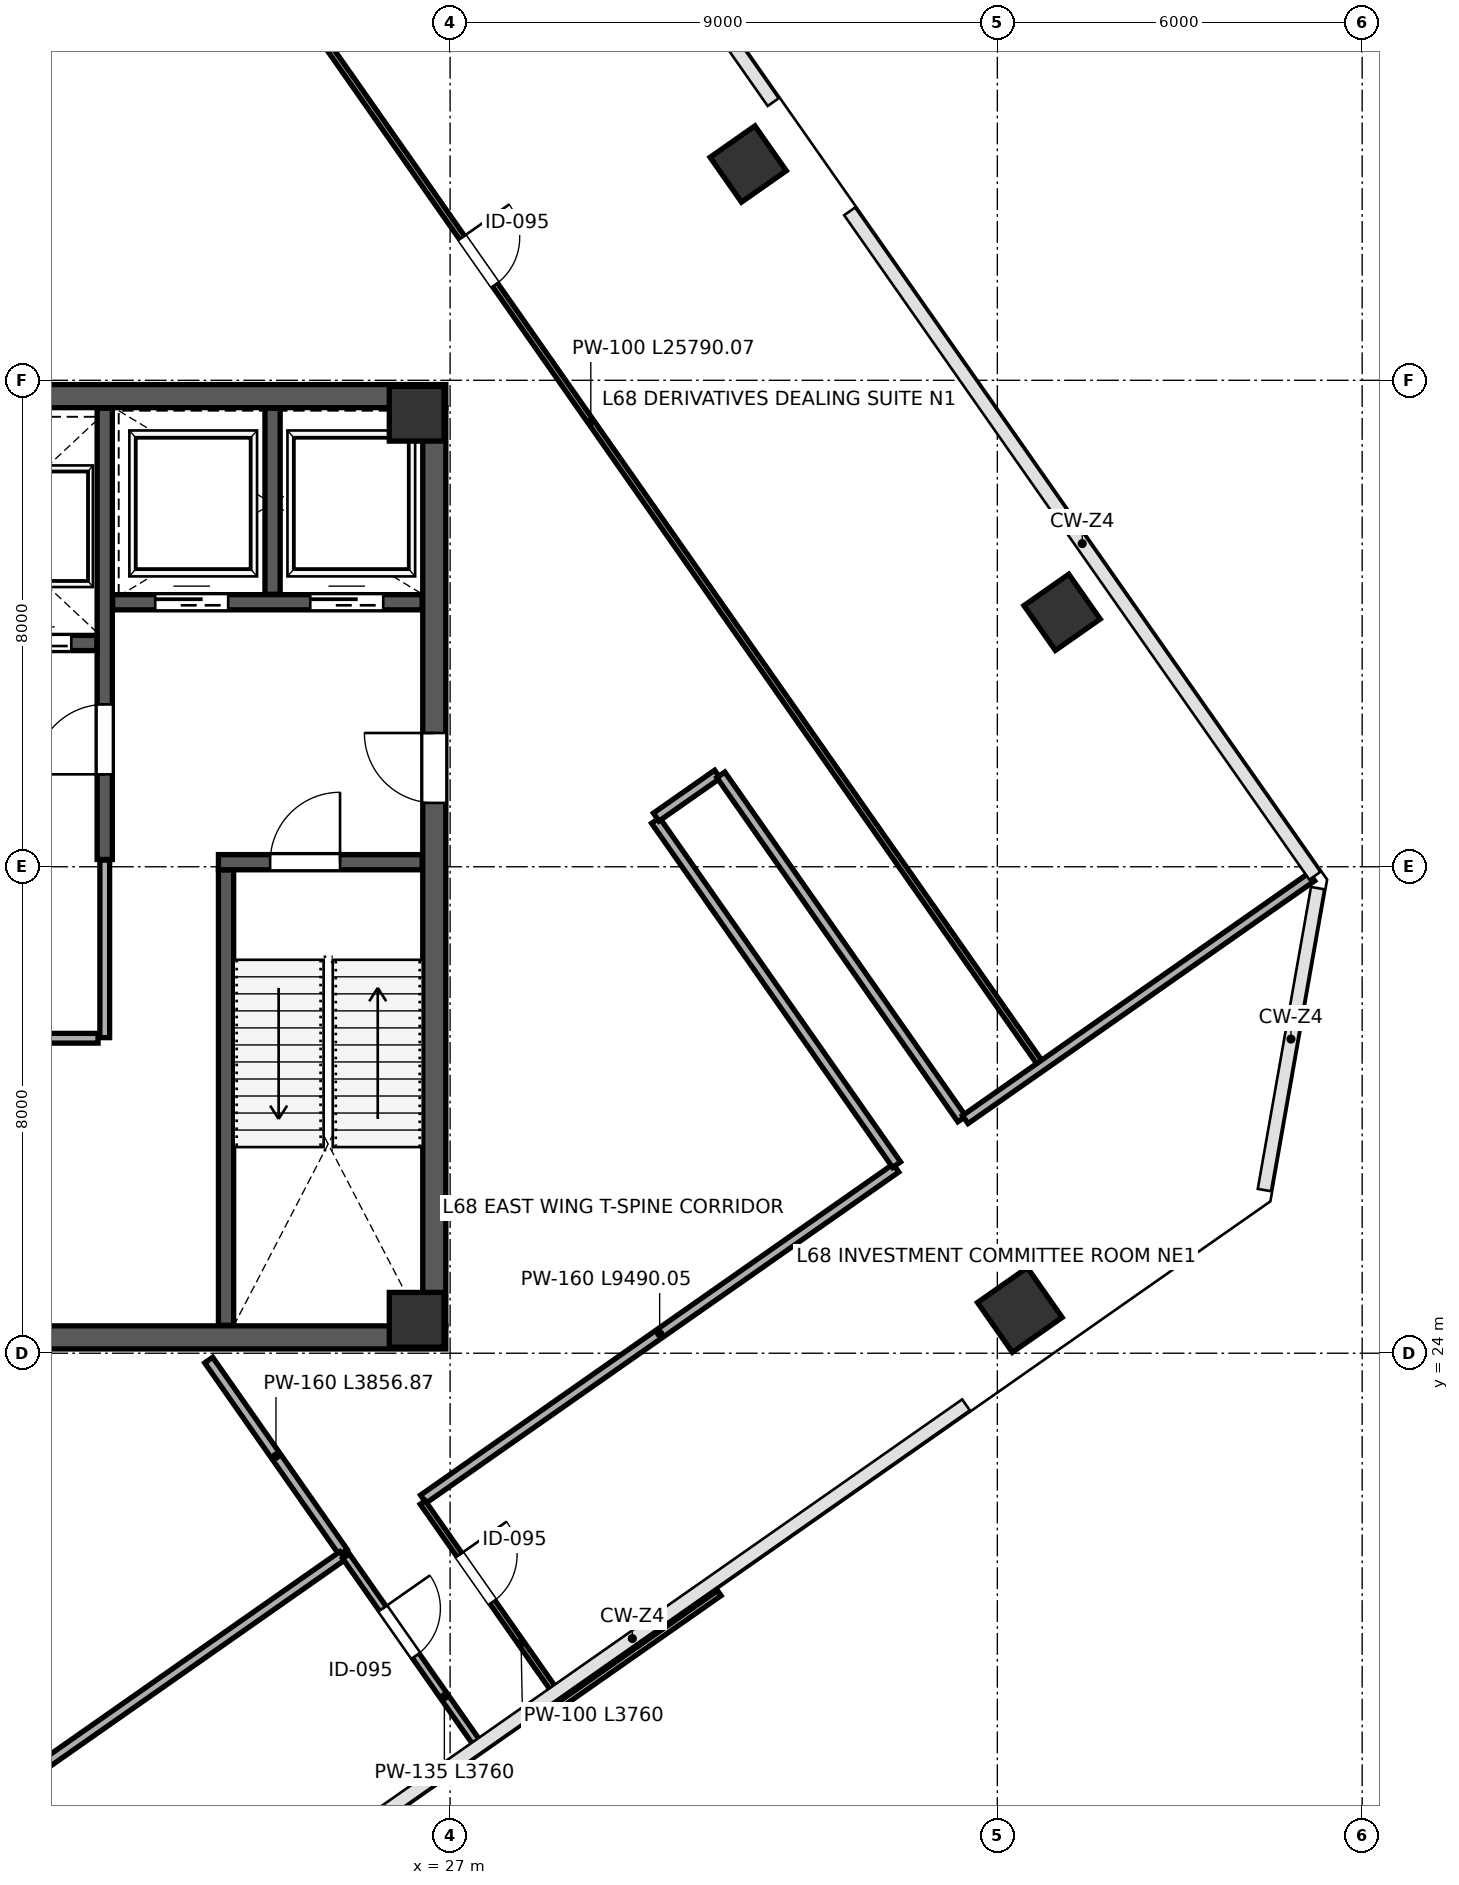
"""IFC4 building model, lengths in metres.
Left out: names, types, materials, properties, quantities, classifications, styles, units other than length and angle.
Written with IfcOpenShell. Run it as: python <this file> out.ifc"""

import sys

from ifc_helpers import new_model, si_unit, direction, frame, frame_2d, origin, origin_2d, place, context, subcontext, project, spatial, rectangle, extrude, clip, halfspace, source, transform, mapped, element, fill, save


model = new_model("IFC4")
c1 = context("Model", 3, precision=1e-05, world=origin(), true_north=direction((0.0, 1.0)))
c2 = subcontext(c1, "Body", "Model", "MODEL_VIEW")
j1 = project(units=[si_unit("LENGTHUNIT", "METRE"), si_unit("PLANEANGLEUNIT", "RADIAN")], contexts=[c1])
p1 = place(None, origin())
s1 = spatial("IfcSite", under=j1, at=p1, CompositionType="ELEMENT")
p2 = place(p1, origin())
s2 = spatial("IfcBuilding", under=s1, at=p2, CompositionType="ELEMENT")
p3 = place(p2, frame((0.0, 0.0, 303.0)))
s3 = spatial("IfcBuildingStorey", under=s2, at=p3, CompositionType="ELEMENT", Elevation=303.0)
m1 = source(origin(), c2, "Body", "SweptSolid", [
    extrude(rectangle(XDim=0.9, YDim=0.9, at=origin_2d()), origin(), (0.0, 0.0, 1.0), 4.198),
])
for number, where, z_axis, x_axis in (
    (1, (26.45, 24.55, 0.001), (0.0, 0.0, 1.0), (1.0, 0.0, 0.0)),
    (2, (26.45, 39.45, 0.001), (0.0, 0.0, 1.0), (1.0, 0.0, 0.0)),
):
    element("IfcColumn", number, at=place(p3, frame(where, z_axis=z_axis, x_axis=x_axis)), inside=s3, PredefinedType="COLUMN", context=c2, shape_type="MappedRepresentation", body=[
        mapped(m1, transform((0.0, 0.0, 0.0), scale=1.0)),
    ])
p4 = place(p3, frame((31.903, 43.557, 0.0), z_axis=(0.116149103088, -0.109205406707, 0.987209990325), x_axis=(-0.982055587014, 0.136059325821, 0.130593582814)))
e3 = element("IfcColumn", 3, at=p4, inside=s3, PredefinedType="COLUMN", context=c2, shape_type="Clipping", body=[
    clip(clip(extrude(rectangle(XDim=0.9, YDim=0.9, at=origin_2d()), origin(), (0.0, 0.0, 1.0), 4.254), halfspace(frame((0.0, 0.0, 0.102), z_axis=(0.0, 0.0, -1.0), x_axis=(1.0, 0.0, 0.0)), False)), halfspace(frame((0.0, 0.0, 4.152), z_axis=(0.0, 0.0, 1.0), x_axis=(1.0, 0.0, 0.0)), False)),
])
p5 = place(p3, frame((37.065, 36.184, 0.0), z_axis=(0.039386712423, -0.160356091191, 0.986273091442), x_axis=(-0.749730751195, 0.647771912034, 0.135260307157)))
e4 = element("IfcColumn", 4, at=p5, inside=s3, PredefinedType="COLUMN", context=c2, shape_type="Clipping", body=[
    clip(clip(extrude(rectangle(XDim=0.9, YDim=0.9, at=origin_2d()), origin(), (0.0, 0.0, 1.0), 4.258), halfspace(frame((0.0, 0.0, 0.106), z_axis=(0.0, 0.0, -1.0), x_axis=(1.0, 0.0, 0.0)), False)), halfspace(frame((0.0, 0.0, 4.153), z_axis=(0.0, 0.0, 1.0), x_axis=(1.0, 0.0, 0.0)), False)),
])
p6 = place(p3, frame((36.37, 24.711, 0.0), z_axis=(-0.077911131198, -0.150609091116, 0.985518522053), x_axis=(-0.138522674046, 0.980570116481, 0.138901819423)))
e5 = element("IfcColumn", 5, at=p6, inside=s3, PredefinedType="COLUMN", context=c2, shape_type="Clipping", body=[
    clip(clip(extrude(rectangle(XDim=1.0, YDim=1.0, at=origin_2d()), origin(), (0.0, 0.0, 1.0), 4.262), halfspace(frame((0.0, 0.0, 0.121), z_axis=(0.0, 0.0, -1.0), x_axis=(1.0, 0.0, 0.0)), False)), halfspace(frame((0.0, 0.0, 4.141), z_axis=(0.0, 0.0, 1.0), x_axis=(1.0, 0.0, 0.0)), False)),
])
p7 = place(p3, frame((26.74, 24.45, 0.0), z_axis=(0.0, 0.0, 1.0), x_axis=(0.0, 1.0, 0.0)))
e6 = element("IfcWall", 6, at=p7, inside=s3, PredefinedType="SHEAR", context=c2, shape_type="SweptSolid", body=[
    extrude(rectangle(XDim=15.1, YDim=0.38, at=frame_2d((7.55, 0.0))), origin(), (0.0, 0.0, 1.0), 3.96),
])
p8 = place(p7, frame((8.6, 0.0, 0.0)))
e7 = element("IfcOpeningElement", 7, at=p8, cuts=e6, PredefinedType="OPENING", context=c2, shape_type="SweptSolid", body=[
    extrude(rectangle(XDim=1.15, YDim=2.2, at=frame_2d((0.575, 1.1))), frame((0.0, 0.2, 0.0), z_axis=(0.0, -1.0, 0.0), x_axis=(1.0, 0.0, 0.0)), (0.0, 0.0, 1.0), 0.4),
])
for number, where, z_axis, x_axis in (
    (8, (9.07, 24.26, 0.0), (0.0, 0.0, 1.0), (1.0, 0.0, 0.0)),
    (9, (9.07, 39.74, 0.0), (0.0, 0.0, 1.0), (1.0, 0.0, 0.0)),
):
    element("IfcWall", number, at=place(p3, frame(where, z_axis=z_axis, x_axis=x_axis)), inside=s3, PredefinedType="SHEAR", context=c2, shape_type="SweptSolid", body=[
        extrude(rectangle(XDim=17.86, YDim=0.38, at=frame_2d((8.93, 0.0))), origin(), (0.0, 0.0, 1.0), 3.96),
    ])
p9 = place(p3, frame((23.315, 24.46, 0.0), z_axis=(0.0, 0.0, 1.0), x_axis=(0.0, 1.0, 0.0)))
e10 = element("IfcWall", 10, at=p9, inside=s3, PredefinedType="SHEAR", context=c2, shape_type="SweptSolid", body=[
    extrude(rectangle(XDim=7.49, YDim=0.25, at=frame_2d((3.745, 0.0))), origin(), (0.0, 0.0, 1.0), 3.96),
])
p10 = place(p3, frame((23.19, 32.075, 0.0), z_axis=(0.0, 0.0, 1.0), x_axis=(1.0, 0.0, 0.0)))
e11 = element("IfcWall", 11, at=p10, inside=s3, PredefinedType="SHEAR", context=c2, shape_type="SweptSolid", body=[
    extrude(rectangle(XDim=3.35, YDim=0.25, at=frame_2d((1.675, 0.0))), origin(), (0.0, 0.0, 1.0), 3.96),
])
p11 = place(p10, frame((0.85, 0.0, 0.0)))
e12 = element("IfcOpeningElement", 12, at=p11, cuts=e11, PredefinedType="OPENING", context=c2, shape_type="SweptSolid", body=[
    extrude(rectangle(XDim=1.15, YDim=2.2, at=frame_2d((0.575, 1.1))), frame((0.0, 0.135, 0.0), z_axis=(0.0, -1.0, 0.0), x_axis=(1.0, 0.0, 0.0)), (0.0, 0.0, 1.0), 0.27),
])
p12 = place(p3, frame((21.32, 32.12, 0.0), z_axis=(0.0, 0.0, 1.0), x_axis=(0.0, 1.0, 0.0)))
e13 = element("IfcWall", 13, at=p12, inside=s3, PredefinedType="SHEAR", context=c2, shape_type="SweptSolid", body=[
    extrude(rectangle(XDim=7.42, YDim=0.25, at=frame_2d((3.71, 0.0))), origin(), (0.0, 0.0, 1.0), 3.96),
])
p13 = place(p12, frame((1.4, 0.0, 0.0)))
e14 = element("IfcOpeningElement", 14, at=p13, cuts=e13, PredefinedType="OPENING", context=c2, shape_type="SweptSolid", body=[
    extrude(rectangle(XDim=1.15, YDim=2.2, at=frame_2d((0.575, 1.1))), frame((0.0, 0.135, 0.0), z_axis=(0.0, -1.0, 0.0), x_axis=(1.0, 0.0, 0.0)), (0.0, 0.0, 1.0), 0.27),
])
p14 = place(p3, frame((21.45, 36.35, 0.0), z_axis=(0.0, 0.0, 1.0), x_axis=(1.0, 0.0, 0.0)))
e15 = element("IfcWall", 15, at=p14, inside=s3, PredefinedType="SHEAR", context=c2, shape_type="SweptSolid", body=[
    extrude(rectangle(XDim=5.09, YDim=0.25, at=frame_2d((2.545, 0.0))), origin(), (0.0, 0.0, 1.0), 3.96),
])
p15 = place(p14, frame((0.7, 0.0, 0.0)))
e16 = element("IfcOpeningElement", 16, at=p15, cuts=e15, PredefinedType="OPENING", context=c2, shape_type="SweptSolid", body=[
    extrude(rectangle(XDim=1.2, YDim=2.2, at=frame_2d((0.6, 1.1))), frame((0.0, 0.135, 0.0), z_axis=(0.0, -1.0, 0.0), x_axis=(1.0, 0.0, 0.0)), (0.0, 0.0, 1.0), 0.27),
])
p16 = place(p14, frame((3.25, 0.0, 0.0)))
e17 = element("IfcOpeningElement", 17, at=p16, cuts=e15, PredefinedType="OPENING", context=c2, shape_type="SweptSolid", body=[
    extrude(rectangle(XDim=1.2, YDim=2.2, at=frame_2d((0.6, 1.1))), frame((0.0, 0.135, 0.0), z_axis=(0.0, -1.0, 0.0), x_axis=(1.0, 0.0, 0.0)), (0.0, 0.0, 1.0), 0.27),
])
p17 = place(p3, frame((24.08, 36.48, 0.0), z_axis=(0.0, 0.0, 1.0), x_axis=(0.0, 1.0, 0.0)))
e18 = element("IfcWall", 18, at=p17, inside=s3, PredefinedType="SHEAR", context=c2, shape_type="SweptSolid", body=[
    extrude(rectangle(XDim=3.06, YDim=0.25, at=frame_2d((1.53, 0.0))), origin(), (0.0, 0.0, 1.0), 3.96),
])
p18 = place(p3, frame((17.32, 35.68, 0.0), z_axis=(0.0, 0.0, 1.0), x_axis=(1.0, 0.0, 0.0)))
e19 = element("IfcWall", 19, at=p18, inside=s3, PredefinedType="SHEAR", context=c2, shape_type="SweptSolid", body=[
    extrude(rectangle(XDim=3.87, YDim=0.25, at=frame_2d((1.935, 0.0))), origin(), (0.0, 0.0, 1.0), 3.96),
])
p19 = place(p18, frame((0.45, 0.0, 0.0)))
e20 = element("IfcOpeningElement", 20, at=p19, cuts=e19, PredefinedType="OPENING", context=c2, shape_type="SweptSolid", body=[
    extrude(rectangle(XDim=1.1, YDim=2.2, at=frame_2d((0.55, 1.1))), frame((0.0, 0.135, 0.0), z_axis=(0.0, -1.0, 0.0), x_axis=(1.0, 0.0, 0.0)), (0.0, 0.0, 1.0), 0.27),
])
p20 = place(p18, frame((2.35, 0.0, 0.0)))
e21 = element("IfcOpeningElement", 21, at=p20, cuts=e19, PredefinedType="OPENING", context=c2, shape_type="SweptSolid", body=[
    extrude(rectangle(XDim=1.1, YDim=2.2, at=frame_2d((0.55, 1.1))), frame((0.0, 0.135, 0.0), z_axis=(0.0, -1.0, 0.0), x_axis=(1.0, 0.0, 0.0)), (0.0, 0.0, 1.0), 0.27),
])
p21 = place(p3, frame((12.84, 29.18, 0.0), z_axis=(0.0, 0.0, 1.0), x_axis=(1.0, 0.0, 0.0)))
e22 = element("IfcWall", 22, at=p21, inside=s3, PredefinedType="PARTITIONING", context=c2, shape_type="SweptSolid", body=[
    extrude(rectangle(XDim=8.37, YDim=0.16, at=frame_2d((4.185, 0.0))), origin(), (0.0, 0.0, 1.0), 3.96),
])
p22 = place(p21, frame((0.95, 0.0, 0.0)))
e23 = element("IfcOpeningElement", 23, at=p22, cuts=e22, PredefinedType="OPENING", context=c2, shape_type="SweptSolid", body=[
    extrude(rectangle(XDim=0.85, YDim=2.1, at=frame_2d((0.425, 1.05))), frame((0.0, 0.09, 0.0), z_axis=(0.0, -1.0, 0.0), x_axis=(1.0, 0.0, 0.0)), (0.0, 0.0, 1.0), 0.18),
])
p23 = place(p21, frame((4.2, 0.0, 0.0)))
e24 = element("IfcOpeningElement", 24, at=p23, cuts=e22, PredefinedType="OPENING", context=c2, shape_type="SweptSolid", body=[
    extrude(rectangle(XDim=0.85, YDim=2.1, at=frame_2d((0.425, 1.05))), frame((0.0, 0.09, 0.0), z_axis=(0.0, -1.0, 0.0), x_axis=(1.0, 0.0, 0.0)), (0.0, 0.0, 1.0), 0.18),
])
p24 = place(p3, frame((21.32, 29.19, 0.0), z_axis=(0.0, 0.0, 1.0), x_axis=(0.0, 1.0, 0.0)))
e25 = element("IfcWall", 25, at=p24, inside=s3, PredefinedType="PARTITIONING", context=c2, shape_type="SweptSolid", body=[
    extrude(rectangle(XDim=2.92, YDim=0.16, at=frame_2d((1.46, 0.0))), origin(), (0.0, 0.0, 1.0), 3.96),
])
p25 = place(p3, frame((23.03, 23.887, 0.0), z_axis=(0.0, 0.0, 1.0), x_axis=(0.573602525203, -0.819133776059, 0.0)))
e26 = element("IfcWall", 26, at=p25, inside=s3, PredefinedType="PARTITIONING", context=c2, shape_type="SweptSolid", body=[
    extrude(rectangle(XDim=3.857, YDim=0.16, at=frame_2d((1.928, 0.0))), origin(), (0.0, 0.0, 1.0), 3.96),
])
p26 = place(p3, frame((21.918, 49.884, 0.0), z_axis=(0.0, 0.0, 1.0), x_axis=(0.57358495776, -0.819146077468, 0.0)))
e27 = element("IfcWall", 27, at=p26, inside=s3, PredefinedType="PARTITIONING", context=c2, shape_type="SweptSolid", body=[
    extrude(rectangle(XDim=25.79, YDim=0.1, at=frame_2d((12.895, 0.0))), origin(), (0.0, 0.0, 1.0), 3.96),
])
p27 = place(p26, frame((9.2, 0.0, 0.0)))
e28 = element("IfcOpeningElement", 28, at=p27, cuts=e27, PredefinedType="OPENING", context=c2, shape_type="SweptSolid", body=[
    extrude(rectangle(XDim=0.95, YDim=2.15, at=frame_2d((0.475, 1.075))), frame((0.0, 0.06, 0.0), z_axis=(0.0, -1.0, 0.0), x_axis=(1.0, 0.0, 0.0)), (0.0, 0.0, 1.0), 0.12),
])
p28 = place(p3, frame((2.071, 36.036, 0.0), z_axis=(0.0, 0.0, 1.0), x_axis=(0.819154854942, 0.573572422302, 0.0)))
e29 = element("IfcWall", 29, at=p28, inside=s3, PredefinedType="PARTITIONING", context=c2, shape_type="SweptSolid", body=[
    extrude(rectangle(XDim=29.62, YDim=0.115, at=frame_2d((14.81, 0.0))), origin(), (0.0, 0.0, 1.0), 3.96),
])
p29 = place(p28, frame((4.2, 0.0, 0.0)))
e30 = element("IfcOpeningElement", 30, at=p29, cuts=e29, PredefinedType="OPENING", context=c2, shape_type="SweptSolid", body=[
    extrude(rectangle(XDim=0.95, YDim=2.15, at=frame_2d((0.475, 1.075))), frame((0.0, 0.067, 0.0), z_axis=(0.0, -1.0, 0.0), x_axis=(1.0, 0.0, 0.0)), (0.0, 0.0, 1.0), 0.135),
])
p30 = place(p3, frame((26.559, 21.601, 0.0), z_axis=(0.0, 0.0, 1.0), x_axis=(0.819143682501, 0.573588378036, 0.0)))
e31 = element("IfcWall", 31, at=p30, inside=s3, PredefinedType="PARTITIONING", context=c2, shape_type="SweptSolid", body=[
    extrude(rectangle(XDim=9.49, YDim=0.16, at=frame_2d((4.745, 0.0))), origin(), (0.0, 0.0, 1.0), 3.96),
])
p31 = place(p3, frame((30.379, 32.76, 0.0), z_axis=(0.0, 0.0, 1.0), x_axis=(0.573609352737, -0.819128995002, 0.0)))
e32 = element("IfcWall", 32, at=p31, inside=s3, PredefinedType="PARTITIONING", context=c2, shape_type="SweptSolid", body=[
    extrude(rectangle(XDim=6.91, YDim=0.16, at=frame_2d((3.455, 0.0))), origin(), (0.0, 0.0, 1.0), 3.96),
])
p32 = place(p3, frame((30.389, 32.816, 0.0), z_axis=(0.0, 0.0, 1.0), x_axis=(0.819129336916, 0.573608864475, 0.0)))
e33 = element("IfcWall", 33, at=p32, inside=s3, PredefinedType="PARTITIONING", context=c2, shape_type="SweptSolid", body=[
    extrude(rectangle(XDim=1.23, YDim=0.16, at=frame_2d((0.615, 0.0))), origin(), (0.0, 0.0, 1.0), 3.96),
])
p33 = place(p3, frame((31.453, 33.512, 0.0), z_axis=(0.0, 0.0, 1.0), x_axis=(0.573585645457, -0.819145595927, 0.0)))
e34 = element("IfcWall", 34, at=p33, inside=s3, PredefinedType="PARTITIONING", context=c2, shape_type="SweptSolid", body=[
    extrude(rectangle(XDim=6.91, YDim=0.16, at=frame_2d((3.455, 0.0))), origin(), (0.0, 0.0, 1.0), 3.96),
])
p34 = place(p3, frame((35.472, 27.842, 0.0), z_axis=(0.0, 0.0, 1.0), x_axis=(0.819151164872, 0.573577692287, 0.0)))
e35 = element("IfcWall", 35, at=p34, inside=s3, PredefinedType="PARTITIONING", context=c2, shape_type="SweptSolid", body=[
    extrude(rectangle(XDim=6.96, YDim=0.16, at=frame_2d((3.48, 0.0))), origin(), (0.0, 0.0, 1.0), 3.96),
])
p35 = place(p3, frame((15.747, 14.03, 0.0), z_axis=(0.0, 0.0, 1.0), x_axis=(0.819150694041, 0.573578364701, 0.0)))
e36 = element("IfcWall", 36, at=p35, inside=s3, PredefinedType="PARTITIONING", context=c2, shape_type="SweptSolid", body=[
    extrude(rectangle(XDim=11.58, YDim=0.16, at=frame_2d((5.79, 0.0))), origin(), (0.0, 0.0, 1.0), 3.96),
])
p36 = place(p3, frame((26.55, 21.546, 0.0), z_axis=(0.0, 0.0, 1.0), x_axis=(0.573614860738, -0.8191251379, 0.0)))
e37 = element("IfcWall", 37, at=p36, inside=s3, PredefinedType="PARTITIONING", context=c2, shape_type="SweptSolid", body=[
    extrude(rectangle(XDim=3.76, YDim=0.1, at=frame_2d((1.88, 0.0))), origin(), (0.0, 0.0, 1.0), 3.96),
])
p37 = place(p36, frame((1.05, 0.0, 0.0)))
e38 = element("IfcOpeningElement", 38, at=p37, cuts=e37, PredefinedType="OPENING", context=c2, shape_type="SweptSolid", body=[
    extrude(rectangle(XDim=0.95, YDim=2.15, at=frame_2d((0.475, 1.075))), frame((0.0, 0.06, 0.0), z_axis=(0.0, -1.0, 0.0), x_axis=(1.0, 0.0, 0.0)), (0.0, 0.0, 1.0), 0.12),
])
p38 = place(p3, frame((25.288, 20.662, 0.0), z_axis=(0.0, 0.0, 1.0), x_axis=(0.573614860738, -0.8191251379, 0.0)))
e39 = element("IfcWall", 39, at=p38, inside=s3, PredefinedType="PARTITIONING", context=c2, shape_type="SweptSolid", body=[
    extrude(rectangle(XDim=3.76, YDim=0.135, at=frame_2d((1.88, 0.0))), origin(), (0.0, 0.0, 1.0), 3.96),
])
p39 = place(p38, frame((1.05, 0.0, 0.0)))
e40 = element("IfcOpeningElement", 40, at=p39, cuts=e39, PredefinedType="OPENING", context=c2, shape_type="SweptSolid", body=[
    extrude(rectangle(XDim=0.95, YDim=2.15, at=frame_2d((0.475, 1.075))), frame((0.0, 0.078, 0.0), z_axis=(0.0, -1.0, 0.0), x_axis=(1.0, 0.0, 0.0)), (0.0, 0.0, 1.0), 0.155),
])
m2 = source(origin(), c2, "Body", "SweptSolid", [
    extrude(rectangle(XDim=1.15, YDim=2.2, at=frame_2d((0.575, 1.1))), frame((0.0, 0.025, 0.0), z_axis=(0.0, -1.0, 0.0), x_axis=(1.0, 0.0, 0.0)), (0.0, 0.0, 1.0), 0.05),
])
p40 = place(p13, origin())
e41 = element("IfcDoor", 41, at=p40, inside=s3, OperationType="SINGLE_SWING_LEFT", PredefinedType="DOOR", context=c2, shape_type="MappedRepresentation", body=[
    mapped(m2, transform((0.0, 0.0, 0.0), scale=1.0)),
])
fill(e14, e41)
m3 = source(origin(), c2, "Body", "SweptSolid", [
    extrude(rectangle(XDim=1.15, YDim=2.2, at=frame_2d((0.575, 1.1))), frame((0.0, 0.025, 0.0), z_axis=(0.0, -1.0, 0.0), x_axis=(1.0, 0.0, 0.0)), (0.0, 0.0, 1.0), 0.05),
])
p41 = place(p11, origin())
e42 = element("IfcDoor", 42, at=p41, inside=s3, OperationType="SINGLE_SWING_RIGHT", PredefinedType="DOOR", context=c2, shape_type="MappedRepresentation", body=[
    mapped(m3, transform((0.0, 0.0, 0.0), scale=1.0)),
])
fill(e12, e42)
p42 = place(p8, origin())
e43 = element("IfcDoor", 43, at=p42, inside=s3, OperationType="SINGLE_SWING_RIGHT", PredefinedType="DOOR", context=c2, shape_type="MappedRepresentation", body=[
    mapped(m2, transform((0.0, 0.0, 0.0), scale=1.0)),
])
fill(e7, e43)
m4 = source(origin(), c2, "Body", "SweptSolid", [
    extrude(rectangle(XDim=1.1, YDim=2.2, at=frame_2d((0.55, 1.1))), frame((0.0, 0.025, 0.0), z_axis=(0.0, -1.0, 0.0), x_axis=(1.0, 0.0, 0.0)), (0.0, 0.0, 1.0), 0.05),
])
p43 = place(p20, origin())
e44 = element("IfcDoor", 44, at=p43, inside=s3, OperationType="SLIDING_TO_RIGHT", PredefinedType="DOOR", context=c2, shape_type="MappedRepresentation", body=[
    mapped(m4, transform((0.0, 0.0, 0.0), scale=1.0)),
])
fill(e21, e44)
m5 = source(origin(), c2, "Body", "SweptSolid", [
    extrude(rectangle(XDim=1.2, YDim=2.2, at=frame_2d((0.6, 1.1))), frame((0.0, 0.025, 0.0), z_axis=(0.0, -1.0, 0.0), x_axis=(1.0, 0.0, 0.0)), (0.0, 0.0, 1.0), 0.05),
])
p44 = place(p15, origin())
e45 = element("IfcDoor", 45, at=p44, inside=s3, OperationType="SLIDING_TO_LEFT", PredefinedType="DOOR", context=c2, shape_type="MappedRepresentation", body=[
    mapped(m5, transform((0.0, 0.0, 0.0), scale=1.0)),
])
fill(e16, e45)
p45 = place(p16, origin())
e46 = element("IfcDoor", 46, at=p45, inside=s3, OperationType="SLIDING_TO_RIGHT", PredefinedType="DOOR", context=c2, shape_type="MappedRepresentation", body=[
    mapped(m5, transform((0.0, 0.0, 0.0), scale=1.0)),
])
fill(e17, e46)
m6 = source(origin(), c2, "Body", "SweptSolid", [
    extrude(rectangle(XDim=0.95, YDim=2.15, at=frame_2d((0.475, 1.075))), frame((0.0, 0.025, 0.0), z_axis=(0.0, -1.0, 0.0), x_axis=(1.0, 0.0, 0.0)), (0.0, 0.0, 1.0), 0.05),
])
p46 = place(p27, origin())
e47 = element("IfcDoor", 47, at=p46, inside=s3, OperationType="SINGLE_SWING_LEFT", PredefinedType="DOOR", context=c2, shape_type="MappedRepresentation", body=[
    mapped(m6, transform((0.0, 0.0, 0.0), scale=1.0)),
])
fill(e28, e47)
p47 = place(p37, origin())
e48 = element("IfcDoor", 48, at=p47, inside=s3, OperationType="SINGLE_SWING_LEFT", PredefinedType="DOOR", context=c2, shape_type="MappedRepresentation", body=[
    mapped(m6, transform((0.0, 0.0, 0.0), scale=1.0)),
])
fill(e38, e48)
p48 = place(p39, origin())
e49 = element("IfcDoor", 49, at=p48, inside=s3, OperationType="SINGLE_SWING_LEFT", PredefinedType="DOOR", context=c2, shape_type="MappedRepresentation", body=[
    mapped(m6, transform((0.0, 0.0, 0.0), scale=1.0)),
])
fill(e40, e49)
save(model, sys.argv[1])
